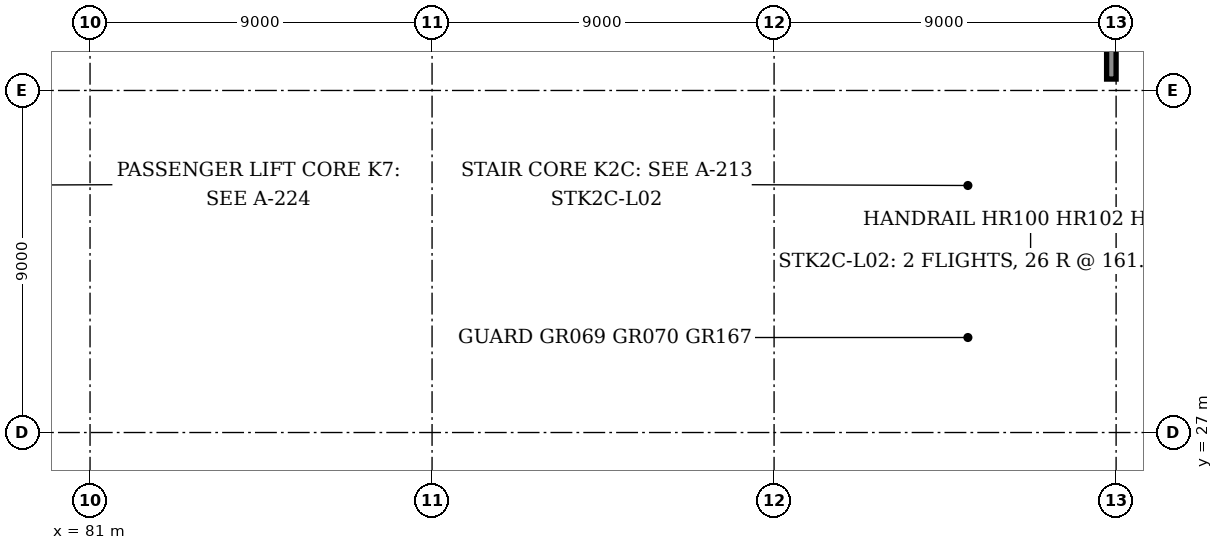
"""IFC4 building model, lengths in metres.
Left out: names, types, materials, properties, quantities, classifications, styles, units other than length and angle.
Written with IfcOpenShell. Run it as: python <this file> out.ifc"""

import sys

from ifc_helpers import new_model, si_unit, direction, frame, frame_2d, origin, origin_2d, place, context, subcontext, project, spatial, rectangle, hollow_circle, i_section, extrude, element, fill, save


model = new_model("IFC4")
c1 = context("Model", 3, precision=1e-05, world=origin(), true_north=direction((0.0, 1.0)))
c2 = subcontext(c1, "Body", "Model", "MODEL_VIEW")
j1 = project(units=[si_unit("LENGTHUNIT", "METRE"), si_unit("PLANEANGLEUNIT", "RADIAN")], contexts=[c1])
p1 = place(None, origin())
s1 = spatial("IfcSite", under=j1, at=p1, CompositionType="ELEMENT")
p2 = place(p1, origin())
s2 = spatial("IfcBuilding", under=s1, at=p2, CompositionType="ELEMENT")
p3 = place(p2, frame((0.0, 0.0, 9.2)))
s3 = spatial("IfcBuildingStorey", under=s2, at=p3, CompositionType="ELEMENT", Elevation=9.2)
p4 = place(p3, frame((81.0, 27.0, 0.0), z_axis=(0.0, 0.0, 1.0), x_axis=(1.0, 0.0, 0.0)))
e1 = element("IfcColumn", 1, at=p4, inside=s3, PredefinedType="COLUMN", context=c2, shape_type="SweptSolid", body=[
    extrude(hollow_circle(Radius=0.203, WallThickness=0.013, at=origin_2d()), origin(), (0.0, 0.0, 1.0), 4.2),
])
p5 = place(p3, frame((90.0, 27.0, 0.0), z_axis=(0.0, 0.0, 1.0), x_axis=(1.0, 0.0, 0.0)))
e2 = element("IfcColumn", 2, at=p5, inside=s3, PredefinedType="COLUMN", context=c2, shape_type="SweptSolid", body=[
    extrude(hollow_circle(Radius=0.162, WallThickness=0.01, at=origin_2d()), origin(), (0.0, 0.0, 1.0), 4.2),
])
p6 = place(p3, frame((99.0, 27.0, 0.0), z_axis=(0.0, 0.0, 1.0), x_axis=(1.0, 0.0, 0.0)))
e3 = element("IfcColumn", 3, at=p6, inside=s3, PredefinedType="COLUMN", context=c2, shape_type="SweptSolid", body=[
    extrude(hollow_circle(Radius=0.203, WallThickness=0.013, at=origin_2d()), origin(), (0.0, 0.0, 1.0), 4.2),
])
p7 = place(p3, frame((81.0, 36.0, 0.0), z_axis=(0.0, 0.0, 1.0), x_axis=(1.0, 0.0, 0.0)))
e4 = element("IfcColumn", 4, at=p7, inside=s3, PredefinedType="COLUMN", context=c2, shape_type="SweptSolid", body=[
    extrude(i_section(OverallWidth=0.309, OverallDepth=0.321, WebThickness=0.014, FlangeThickness=0.022, FilletRadius=0.017, at=origin_2d()), origin(), (0.0, 0.0, 1.0), 4.2),
])
p8 = place(p3, frame((90.0, 36.0, 0.0), z_axis=(0.0, 0.0, 1.0), x_axis=(1.0, 0.0, 0.0)))
e5 = element("IfcColumn", 5, at=p8, inside=s3, PredefinedType="COLUMN", context=c2, shape_type="SweptSolid", body=[
    extrude(i_section(OverallWidth=0.305, OverallDepth=0.308, WebThickness=0.01, FlangeThickness=0.015, FilletRadius=0.017, at=origin_2d()), origin(), (0.0, 0.0, 1.0), 4.2),
])
p9 = place(p3, frame((99.0, 36.0, 0.0), z_axis=(0.0, 0.0, 1.0), x_axis=(1.0, 0.0, 0.0)))
e6 = element("IfcColumn", 6, at=p9, inside=s3, PredefinedType="COLUMN", context=c2, shape_type="SweptSolid", body=[
    extrude(i_section(OverallWidth=0.309, OverallDepth=0.321, WebThickness=0.014, FlangeThickness=0.022, FilletRadius=0.017, at=origin_2d()), origin(), (0.0, 0.0, 1.0), 4.2),
])
p10 = place(p3, frame((107.92, 36.0, 0.0), z_axis=(0.0, 0.0, 1.0), x_axis=(0.0, 1.0, 0.0)))
e7 = element("IfcWall", 7, at=p10, inside=s3, PredefinedType="SOLIDWALL", context=c2, shape_type="SweptSolid", body=[
    extrude(rectangle(XDim=8.875, YDim=0.28, at=frame_2d((4.438, 0.0))), origin(), (0.0, 0.0, 1.0), 2.75),
])
p11 = place(p3, frame((107.875, 36.3, 3.7), z_axis=(0.0, 0.0, 1.0), x_axis=(0.0, 1.0, 0.0)))
e8 = element("IfcWall", 8, at=p11, inside=s3, PredefinedType="PARAPET", context=c2, shape_type="SweptSolid", body=[
    extrude(rectangle(XDim=8.575, YDim=0.25, at=frame_2d((4.288, 0.0))), origin(), (0.0, 0.0, 1.0), 1.6),
])
p12 = place(p3, frame((103.5, 27.15, 0.0), z_axis=(0.0, 0.0, 1.0), x_axis=(1.0, 0.0, 0.0)))
e9 = element("IfcWall", 9, at=p12, inside=s3, PredefinedType="SOLIDWALL", context=c2, shape_type="SweptSolid", body=[
    extrude(rectangle(XDim=4.5, YDim=0.3, at=frame_2d((2.25, 0.0))), origin(), (0.0, 0.0, 1.0), 4.2),
])
p13 = place(p3, frame((107.85, 27.3, 0.0), z_axis=(0.0, 0.0, 1.0), x_axis=(0.0, 1.0, 0.0)))
e10 = element("IfcWall", 10, at=p13, inside=s3, PredefinedType="SOLIDWALL", context=c2, shape_type="SweptSolid", body=[
    extrude(rectangle(XDim=8.4, YDim=0.3, at=frame_2d((4.2, 0.0))), origin(), (0.0, 0.0, 1.0), 4.2),
])
p14 = place(p3, frame((103.5, 35.85, 0.0), z_axis=(0.0, 0.0, 1.0), x_axis=(1.0, 0.0, 0.0)))
e11 = element("IfcWall", 11, at=p14, inside=s3, PredefinedType="SOLIDWALL", context=c2, shape_type="SweptSolid", body=[
    extrude(rectangle(XDim=4.5, YDim=0.3, at=frame_2d((2.25, 0.0))), origin(), (0.0, 0.0, 1.0), 4.2),
])
p15 = place(p14, frame((1.35, 0.0, 0.0)))
e12 = element("IfcOpeningElement", 12, at=p15, cuts=e11, PredefinedType="OPENING", context=c2, shape_type="SweptSolid", body=[
    extrude(rectangle(XDim=1.8, YDim=2.1, at=frame_2d((0.9, 1.05))), frame((0.0, 0.16, 0.0), z_axis=(0.0, -1.0, 0.0), x_axis=(1.0, 0.0, 0.0)), (0.0, 0.0, 1.0), 0.32),
])
p16 = place(p3, frame((103.65, 27.3, 0.0), z_axis=(0.0, 0.0, 1.0), x_axis=(0.0, 1.0, 0.0)))
e13 = element("IfcWall", 13, at=p16, inside=s3, PredefinedType="SOLIDWALL", context=c2, shape_type="SweptSolid", body=[
    extrude(rectangle(XDim=8.4, YDim=0.3, at=frame_2d((4.2, 0.0))), origin(), (0.0, 0.0, 1.0), 4.2),
])
p17 = place(p3, frame((76.5, 27.0, 0.0), z_axis=(0.0, 0.0, 1.0), x_axis=(1.0, 0.0, 0.0)))
e14 = element("IfcWall", 14, at=p17, inside=s3, PredefinedType="PARTITIONING", context=c2, shape_type="SweptSolid", body=[
    extrude(rectangle(XDim=4.297, YDim=0.2, at=frame_2d((2.148, 0.0))), origin(), (0.0, 0.0, 1.0), 3.502),
])
p18 = place(p17, frame((0.955, 0.0, 0.0)))
e15 = element("IfcOpeningElement", 15, at=p18, cuts=e14, PredefinedType="OPENING", context=c2, shape_type="SweptSolid", body=[
    extrude(rectangle(XDim=2.4, YDim=2.4, at=frame_2d((1.2, 1.2))), frame((0.0, 0.11, 0.0), z_axis=(0.0, -1.0, 0.0), x_axis=(1.0, 0.0, 0.0)), (0.0, 0.0, 1.0), 0.22),
])
p19 = place(p3, frame((99.203, 27.0, 0.0), z_axis=(0.0, 0.0, 1.0), x_axis=(1.0, 0.0, 0.0)))
e16 = element("IfcWall", 16, at=p19, inside=s3, PredefinedType="PARTITIONING", context=c2, shape_type="SweptSolid", body=[
    extrude(rectangle(XDim=4.297, YDim=0.2, at=frame_2d((2.148, 0.0))), origin(), (0.0, 0.0, 1.0), 3.502),
])
p20 = place(p19, frame((0.95, 0.0, 0.0)))
e17 = element("IfcOpeningElement", 17, at=p20, cuts=e16, PredefinedType="OPENING", context=c2, shape_type="SweptSolid", body=[
    extrude(rectangle(XDim=2.4, YDim=2.4, at=frame_2d((1.2, 1.2))), frame((0.0, 0.11, 0.0), z_axis=(0.0, -1.0, 0.0), x_axis=(1.0, 0.0, 0.0)), (0.0, 0.0, 1.0), 0.22),
])
p21 = place(p3, frame((81.0, 30.021, 0.0), z_axis=(0.0, 0.0, 1.0), x_axis=(0.0, 1.0, 0.0)))
e18 = element("IfcWall", 18, at=p21, inside=s3, PredefinedType="PARTITIONING", context=c2, shape_type="SweptSolid", body=[
    extrude(rectangle(XDim=3.0, YDim=0.15, at=frame_2d((1.5, 0.0))), origin(), (0.0, 0.0, 1.0), 3.502),
])
p22 = place(p21, frame((0.35, 0.0, 0.0)))
e19 = element("IfcOpeningElement", 19, at=p22, cuts=e18, PredefinedType="OPENING", context=c2, shape_type="SweptSolid", body=[
    extrude(rectangle(XDim=1.0, YDim=2.1, at=frame_2d((0.5, 1.05))), frame((0.0, 0.085, 0.0), z_axis=(0.0, -1.0, 0.0), x_axis=(1.0, 0.0, 0.0)), (0.0, 0.0, 1.0), 0.17),
])
p23 = place(p3, frame((76.5, 35.925, 0.0), z_axis=(0.0, 0.0, 1.0), x_axis=(1.0, 0.0, 0.0)))
e20 = element("IfcWall", 20, at=p23, inside=s3, PredefinedType="PARTITIONING", context=c2, shape_type="SweptSolid", body=[
    extrude(rectangle(XDim=4.345, YDim=0.15, at=frame_2d((2.173, 0.0))), origin(), (0.0, 0.0, 1.0), 3.035),
])
p24 = place(p23, frame((1.641, 0.0, 0.0)))
e21 = element("IfcOpeningElement", 21, at=p24, cuts=e20, PredefinedType="OPENING", context=c2, shape_type="SweptSolid", body=[
    extrude(rectangle(XDim=1.0, YDim=2.1, at=frame_2d((0.5, 1.05))), frame((0.0, 0.085, 0.0), z_axis=(0.0, -1.0, 0.0), x_axis=(1.0, 0.0, 0.0)), (0.0, 0.0, 1.0), 0.17),
])
p25 = place(p3, frame((99.0, 30.021, 0.0), z_axis=(0.0, 0.0, 1.0), x_axis=(0.0, 1.0, 0.0)))
e22 = element("IfcWall", 22, at=p25, inside=s3, PredefinedType="PARTITIONING", context=c2, shape_type="SweptSolid", body=[
    extrude(rectangle(XDim=3.0, YDim=0.15, at=frame_2d((1.5, 0.0))), origin(), (0.0, 0.0, 1.0), 3.502),
])
for number, where, z_axis, x_axis in (
    (23, (81.155, 35.925, 0.0), (0.0, 0.0, 1.0), (1.0, 0.0, 0.0)),
    (24, (90.153, 35.925, 0.0), (0.0, 0.0, 1.0), (1.0, 0.0, 0.0)),
):
    element("IfcWall", number, at=place(p3, frame(where, z_axis=z_axis, x_axis=x_axis)), inside=s3, PredefinedType="PARTITIONING", context=c2, shape_type="SweptSolid", body=[
        extrude(rectangle(XDim=8.693, YDim=0.15, at=frame_2d((4.346, 0.0))), origin(), (0.0, 0.0, 1.0), 3.035),
    ])
p26 = place(p3, frame((99.155, 35.925, 0.0), z_axis=(0.0, 0.0, 1.0), x_axis=(1.0, 0.0, 0.0)))
e25 = element("IfcWall", 25, at=p26, inside=s3, PredefinedType="PARTITIONING", context=c2, shape_type="SweptSolid", body=[
    extrude(rectangle(XDim=4.345, YDim=0.15, at=frame_2d((2.173, 0.0))), origin(), (0.0, 0.0, 1.0), 3.035),
])
p27 = place(p15, frame((1.8, 0.0, 0.0), z_axis=(0.0, 0.0, 1.0), x_axis=(-1.0, 0.0, 0.0)))
e26 = element("IfcDoor", 26, at=p27, inside=s3, OperationType="DOUBLE_DOOR_SINGLE_SWING", PredefinedType="DOOR", context=c2, shape_type="SweptSolid", body=[
    extrude(rectangle(XDim=1.8, YDim=2.1, at=frame_2d((0.9, 1.05))), frame((0.0, 0.025, 0.0), z_axis=(0.0, -1.0, 0.0), x_axis=(1.0, 0.0, 0.0)), (0.0, 0.0, 1.0), 0.05),
])
fill(e12, e26)
p28 = place(p20, frame((2.4, 0.0, 0.0), z_axis=(0.0, 0.0, 1.0), x_axis=(-1.0, 0.0, 0.0)))
e27 = element("IfcDoor", 27, at=p28, inside=s3, OperationType="DOUBLE_DOOR_SINGLE_SWING", PredefinedType="DOOR", context=c2, shape_type="SweptSolid", body=[
    extrude(rectangle(XDim=2.4, YDim=2.4, at=frame_2d((1.2, 1.2))), frame((0.0, 0.025, 0.0), z_axis=(0.0, -1.0, 0.0), x_axis=(1.0, 0.0, 0.0)), (0.0, 0.0, 1.0), 0.05),
])
fill(e17, e27)
p29 = place(p22, frame((1.0, 0.0, 0.0), z_axis=(0.0, 0.0, 1.0), x_axis=(-1.0, 0.0, 0.0)))
e28 = element("IfcDoor", 28, at=p29, inside=s3, OperationType="SINGLE_SWING_LEFT", PredefinedType="DOOR", context=c2, shape_type="SweptSolid", body=[
    extrude(rectangle(XDim=1.0, YDim=2.1, at=frame_2d((0.5, 1.05))), frame((0.0, 0.025, 0.0), z_axis=(0.0, -1.0, 0.0), x_axis=(1.0, 0.0, 0.0)), (0.0, 0.0, 1.0), 0.05),
])
fill(e19, e28)
save(model, sys.argv[1])
